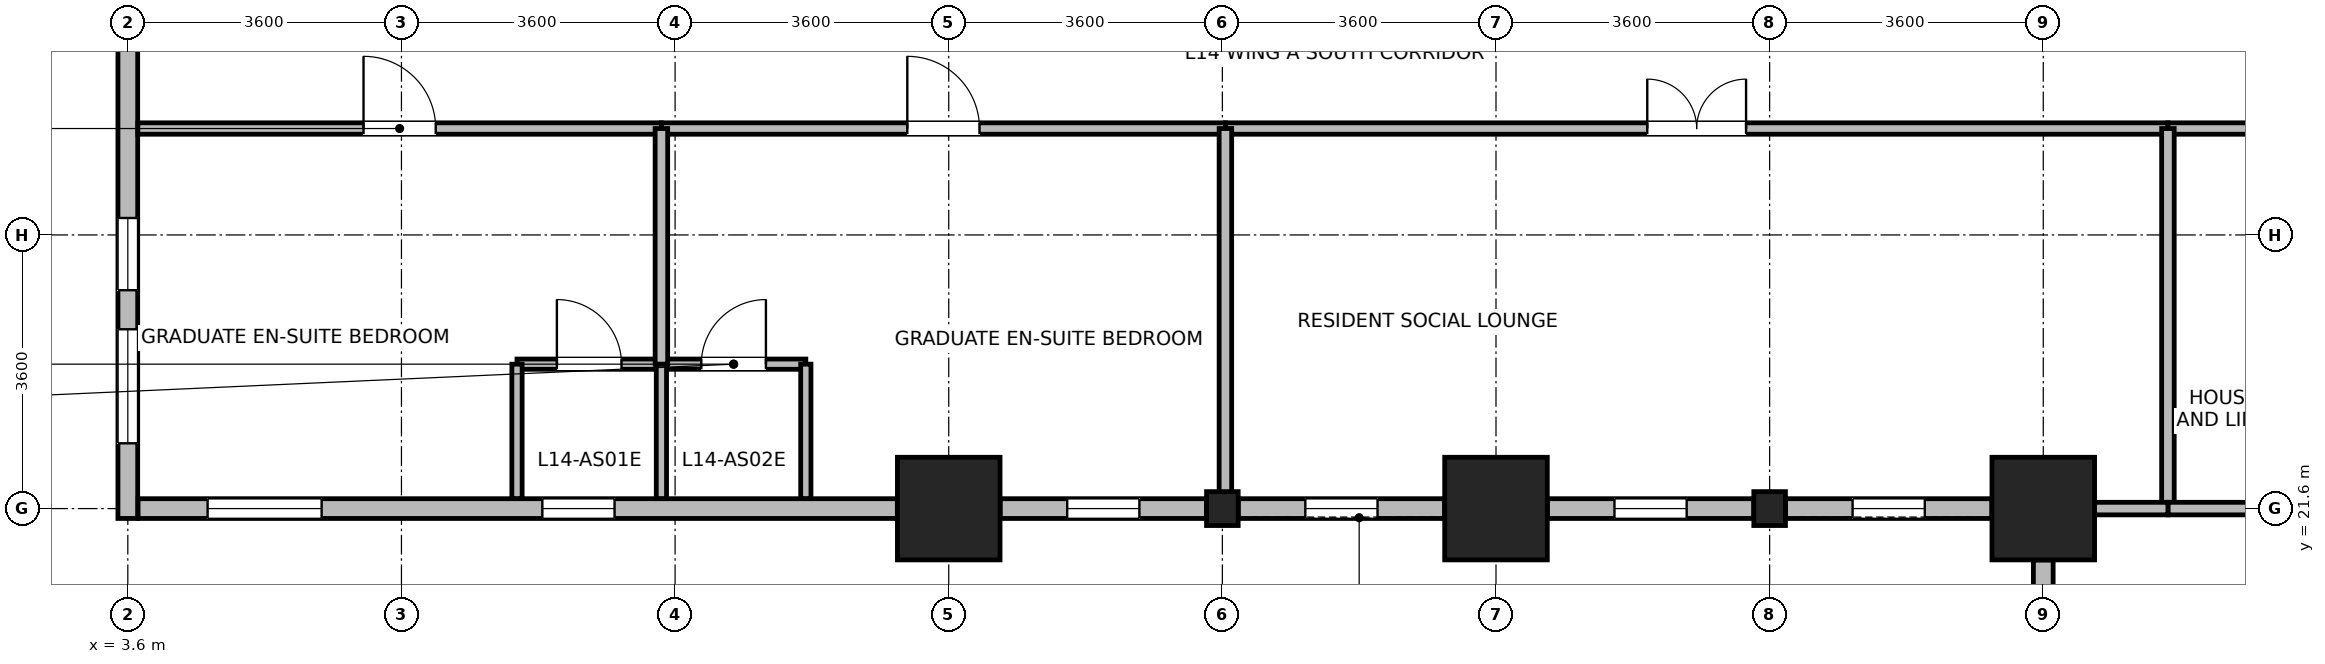
"""IFC4 building model, lengths in metres.
Left out: names, types, materials, properties, quantities, classifications, styles, units other than length and angle.
Written with IfcOpenShell. Run it as: python <this file> out.ifc"""

import sys

from ifc_helpers import new_model, si_unit, direction, frame, frame_2d, origin, origin_2d, place, context, subcontext, project, spatial, rectangle, i_section, extrude, source, transform, mapped, element, fill, save


model = new_model("IFC4")
c1 = context("Model", 3, precision=1e-05, world=origin(), true_north=direction((0.0, 1.0)))
c2 = subcontext(c1, "Body", "Model", "MODEL_VIEW")
j1 = project(units=[si_unit("LENGTHUNIT", "METRE"), si_unit("PLANEANGLEUNIT", "RADIAN")], contexts=[c1])
p1 = place(None, origin())
s1 = spatial("IfcSite", under=j1, at=p1, CompositionType="ELEMENT")
p2 = place(p1, origin())
s2 = spatial("IfcBuilding", under=s1, at=p2, CompositionType="ELEMENT")
p3 = place(p2, frame((0.0, 0.0, 58.6)))
s3 = spatial("IfcBuildingStorey", under=s2, at=p3, CompositionType="ELEMENT", Elevation=58.6)
m1 = source(origin(), c2, "Body", "SweptSolid", [
    extrude(rectangle(XDim=1.35, YDim=1.35, at=origin_2d()), origin(), (0.0, 0.0, 1.0), 3.7),
])
for number, where, z_axis, x_axis in (
    (1, (14.4, 21.6, 0.0), (0.0, 0.0, 1.0), (1.0, 0.0, 0.0)),
    (2, (21.6, 21.6, 0.0), (0.0, 0.0, 1.0), (1.0, 0.0, 0.0)),
    (3, (28.8, 21.6, 0.0), (0.0, 0.0, 1.0), (1.0, 0.0, 0.0)),
):
    element("IfcColumn", number, at=place(p3, frame(where, z_axis=z_axis, x_axis=x_axis)), inside=s3, PredefinedType="COLUMN", context=c2, shape_type="MappedRepresentation", body=[
        mapped(m1, transform((0.0, 0.0, 0.0), x_axis=(1.0, 0.0, 0.0), y_axis=(0.0, 1.0, 0.0), z_axis=(0.0, 0.0, 1.0), scale=1.0)),
    ])
m2 = source(origin(), c2, "Body", "SweptSolid", [
    extrude(i_section(OverallWidth=0.416, OverallDepth=0.446, WebThickness=0.029, FlangeThickness=0.04, FilletRadius=0.015, at=origin_2d()), origin(), (0.0, 0.0, 1.0), 3.7),
])
for number, where, z_axis, x_axis in (
    (4, (18.0, 21.6, 0.0), (0.0, 0.0, 1.0), (1.0, 0.0, 0.0)),
    (5, (25.2, 21.6, 0.0), (0.0, 0.0, 1.0), (1.0, 0.0, 0.0)),
):
    element("IfcColumn", number, at=place(p3, frame(where, z_axis=z_axis, x_axis=x_axis)), inside=s3, PredefinedType="COLUMN", context=c2, shape_type="MappedRepresentation", body=[
        mapped(m2, transform((0.0, 0.0, 0.0), x_axis=(1.0, 0.0, 0.0), y_axis=(0.0, 1.0, 0.0), z_axis=(0.0, 0.0, 1.0), scale=1.0)),
    ])
p4 = place(p3, frame((3.6, 21.47, 0.0), z_axis=(0.0, 0.0, 1.0), x_axis=(0.0, 1.0, 0.0)))
e6 = element("IfcWall", 6, at=p4, inside=s3, PredefinedType="STANDARD", context=c2, shape_type="SweptSolid", body=[
    extrude(rectangle(XDim=6.956, YDim=0.26, at=frame_2d((3.478, 0.0))), origin(), (0.0, 0.0, 1.0), 3.43),
])
p5 = place(p4, frame((0.989, 0.0, 0.85)))
e7 = element("IfcOpeningElement", 7, at=p5, cuts=e6, PredefinedType="OPENING", context=c2, shape_type="SweptSolid", body=[
    extrude(rectangle(XDim=1.5, YDim=1.85, at=frame_2d((0.75, 0.925))), frame((0.0, 0.14, 0.0), z_axis=(0.0, -1.0, 0.0), x_axis=(1.0, 0.0, 0.0)), (0.0, 0.0, 1.0), 0.28),
])
p6 = place(p4, frame((3.003, 0.0, 0.85)))
e8 = element("IfcOpeningElement", 8, at=p6, cuts=e6, PredefinedType="OPENING", context=c2, shape_type="SweptSolid", body=[
    extrude(rectangle(XDim=0.95, YDim=1.75, at=frame_2d((0.475, 0.875))), frame((0.0, 0.14, 0.0), z_axis=(0.0, -1.0, 0.0), x_axis=(1.0, 0.0, 0.0)), (0.0, 0.0, 1.0), 0.28),
])
p7 = place(p3, frame((13.724, 21.6, 0.0), z_axis=(0.0, 0.0, 1.0), x_axis=(-1.0, 0.0, 0.0)))
e9 = element("IfcWall", 9, at=p7, inside=s3, PredefinedType="STANDARD", context=c2, shape_type="SweptSolid", body=[
    extrude(rectangle(XDim=9.989, YDim=0.26, at=frame_2d((4.995, 0.0))), origin(), (0.0, 0.0, 1.0), 3.43),
])
p8 = place(p7, frame((7.574, 0.0, 0.85)))
e10 = element("IfcOpeningElement", 10, at=p8, cuts=e9, PredefinedType="OPENING", context=c2, shape_type="SweptSolid", body=[
    extrude(rectangle(XDim=1.5, YDim=1.85, at=frame_2d((0.75, 0.925))), frame((0.0, 0.14, 0.0), z_axis=(0.0, -1.0, 0.0), x_axis=(1.0, 0.0, 0.0)), (0.0, 0.0, 1.0), 0.28),
])
p9 = place(p7, frame((3.72, 0.0, 0.85)))
e11 = element("IfcOpeningElement", 11, at=p9, cuts=e9, PredefinedType="OPENING", context=c2, shape_type="SweptSolid", body=[
    extrude(rectangle(XDim=0.95, YDim=1.75, at=frame_2d((0.475, 0.875))), frame((0.0, 0.14, 0.0), z_axis=(0.0, -1.0, 0.0), x_axis=(1.0, 0.0, 0.0)), (0.0, 0.0, 1.0), 0.28),
])
p10 = place(p3, frame((17.791, 21.6, 0.0), z_axis=(0.0, 0.0, 1.0), x_axis=(-1.0, 0.0, 0.0)))
e12 = element("IfcWall", 12, at=p10, inside=s3, PredefinedType="STANDARD", context=c2, shape_type="SweptSolid", body=[
    extrude(rectangle(XDim=2.715, YDim=0.26, at=frame_2d((1.357, 0.0))), origin(), (0.0, 0.0, 1.0), 2.93),
])
p11 = place(p10, frame((0.883, 0.0, 0.85)))
e13 = element("IfcOpeningElement", 13, at=p11, cuts=e12, PredefinedType="OPENING", context=c2, shape_type="SweptSolid", body=[
    extrude(rectangle(XDim=0.95, YDim=1.75, at=frame_2d((0.475, 0.875))), frame((0.0, 0.14, 0.0), z_axis=(0.0, -1.0, 0.0), x_axis=(1.0, 0.0, 0.0)), (0.0, 0.0, 1.0), 0.28),
])
p12 = place(p3, frame((20.924, 21.6, 0.0), z_axis=(0.0, 0.0, 1.0), x_axis=(-1.0, 0.0, 0.0)))
e14 = element("IfcWall", 14, at=p12, inside=s3, PredefinedType="STANDARD", context=c2, shape_type="SweptSolid", body=[
    extrude(rectangle(XDim=2.715, YDim=0.26, at=frame_2d((1.357, 0.0))), origin(), (0.0, 0.0, 1.0), 2.93),
])
p13 = place(p12, frame((0.883, 0.0, 0.85)))
e15 = element("IfcOpeningElement", 15, at=p13, cuts=e14, PredefinedType="OPENING", context=c2, shape_type="SweptSolid", body=[
    extrude(rectangle(XDim=0.95, YDim=1.75, at=frame_2d((0.475, 0.875))), frame((0.0, 0.14, 0.0), z_axis=(0.0, -1.0, 0.0), x_axis=(1.0, 0.0, 0.0)), (0.0, 0.0, 1.0), 0.28),
])
p14 = place(p3, frame((24.991, 21.6, 0.0), z_axis=(0.0, 0.0, 1.0), x_axis=(-1.0, 0.0, 0.0)))
e16 = element("IfcWall", 16, at=p14, inside=s3, PredefinedType="STANDARD", context=c2, shape_type="SweptSolid", body=[
    extrude(rectangle(XDim=2.715, YDim=0.26, at=frame_2d((1.357, 0.0))), origin(), (0.0, 0.0, 1.0), 2.93),
])
p15 = place(p14, frame((0.883, 0.0, 0.85)))
e17 = element("IfcOpeningElement", 17, at=p15, cuts=e16, PredefinedType="OPENING", context=c2, shape_type="SweptSolid", body=[
    extrude(rectangle(XDim=0.95, YDim=1.75, at=frame_2d((0.475, 0.875))), frame((0.0, 0.14, 0.0), z_axis=(0.0, -1.0, 0.0), x_axis=(1.0, 0.0, 0.0)), (0.0, 0.0, 1.0), 0.28),
])
p16 = place(p3, frame((28.124, 21.6, 0.0), z_axis=(0.0, 0.0, 1.0), x_axis=(-1.0, 0.0, 0.0)))
e18 = element("IfcWall", 18, at=p16, inside=s3, PredefinedType="STANDARD", context=c2, shape_type="SweptSolid", body=[
    extrude(rectangle(XDim=2.715, YDim=0.26, at=frame_2d((1.357, 0.0))), origin(), (0.0, 0.0, 1.0), 2.93),
])
p17 = place(p16, frame((0.883, 0.0, 0.85)))
e19 = element("IfcOpeningElement", 19, at=p17, cuts=e18, PredefinedType="OPENING", context=c2, shape_type="SweptSolid", body=[
    extrude(rectangle(XDim=0.95, YDim=1.75, at=frame_2d((0.475, 0.875))), frame((0.0, 0.14, 0.0), z_axis=(0.0, -1.0, 0.0), x_axis=(1.0, 0.0, 0.0)), (0.0, 0.0, 1.0), 0.28),
])
p18 = place(p3, frame((28.8, 1.67, 0.0), z_axis=(0.0, 0.0, 1.0), x_axis=(0.0, 1.0, 0.0)))
e20 = element("IfcWall", 20, at=p18, inside=s3, PredefinedType="STANDARD", context=c2, shape_type="SweptSolid", body=[
    extrude(rectangle(XDim=19.254, YDim=0.26, at=frame_2d((9.627, 0.0))), origin(), (0.0, 0.0, 1.0), 3.43),
])
p19 = place(p18, frame((0.854, 0.0, 0.85)))
e21 = element("IfcOpeningElement", 21, at=p19, cuts=e20, PredefinedType="OPENING", context=c2, shape_type="SweptSolid", body=[
    extrude(rectangle(XDim=1.5, YDim=1.85, at=frame_2d((0.75, 0.925))), frame((0.0, 0.14, 0.0), z_axis=(0.0, -1.0, 0.0), x_axis=(1.0, 0.0, 0.0)), (0.0, 0.0, 1.0), 0.28),
])
p20 = place(p18, frame((7.272, 0.0, 0.85)))
e22 = element("IfcOpeningElement", 22, at=p20, cuts=e20, PredefinedType="OPENING", context=c2, shape_type="SweptSolid", body=[
    extrude(rectangle(XDim=1.5, YDim=1.85, at=frame_2d((0.75, 0.925))), frame((0.0, 0.14, 0.0), z_axis=(0.0, -1.0, 0.0), x_axis=(1.0, 0.0, 0.0)), (0.0, 0.0, 1.0), 0.28),
])
p21 = place(p18, frame((10.481, 0.0, 0.85)))
e23 = element("IfcOpeningElement", 23, at=p21, cuts=e20, PredefinedType="OPENING", context=c2, shape_type="SweptSolid", body=[
    extrude(rectangle(XDim=1.5, YDim=1.85, at=frame_2d((0.75, 0.925))), frame((0.0, 0.14, 0.0), z_axis=(0.0, -1.0, 0.0), x_axis=(1.0, 0.0, 0.0)), (0.0, 0.0, 1.0), 0.28),
])
p22 = place(p18, frame((13.69, 0.0, 0.85)))
e24 = element("IfcOpeningElement", 24, at=p22, cuts=e20, PredefinedType="OPENING", context=c2, shape_type="SweptSolid", body=[
    extrude(rectangle(XDim=1.5, YDim=1.85, at=frame_2d((0.75, 0.925))), frame((0.0, 0.14, 0.0), z_axis=(0.0, -1.0, 0.0), x_axis=(1.0, 0.0, 0.0)), (0.0, 0.0, 1.0), 0.28),
])
p23 = place(p18, frame((16.899, 0.0, 0.85)))
e25 = element("IfcOpeningElement", 25, at=p23, cuts=e20, PredefinedType="OPENING", context=c2, shape_type="SweptSolid", body=[
    extrude(rectangle(XDim=1.5, YDim=1.85, at=frame_2d((0.75, 0.925))), frame((0.0, 0.14, 0.0), z_axis=(0.0, -1.0, 0.0), x_axis=(1.0, 0.0, 0.0)), (0.0, 0.0, 1.0), 0.28),
])
p24 = place(p3, frame((10.62, 23.5, 0.0), z_axis=(0.0, 0.0, 1.0), x_axis=(1.0, 0.0, 0.0)))
e26 = element("IfcWall", 26, at=p24, inside=s3, PredefinedType="PARTITIONING", context=c2, shape_type="SweptSolid", body=[
    extrude(rectangle(XDim=1.9, YDim=0.135, at=frame_2d((0.95, 0.0))), origin(), (0.0, 0.0, 1.0), 3.43),
])
p25 = place(p24, frame((0.525, 0.0, 0.0)))
e27 = element("IfcOpeningElement", 27, at=p25, cuts=e26, PredefinedType="OPENING", context=c2, shape_type="SweptSolid", body=[
    extrude(rectangle(XDim=0.85, YDim=2.04, at=frame_2d((0.425, 1.02))), frame((0.0, 0.078, 0.0), z_axis=(0.0, -1.0, 0.0), x_axis=(1.0, 0.0, 0.0)), (0.0, 0.0, 1.0), 0.155),
])
p26 = place(p3, frame((8.72, 23.5, 0.0), z_axis=(0.0, 0.0, 1.0), x_axis=(1.0, 0.0, 0.0)))
e28 = element("IfcWall", 28, at=p26, inside=s3, PredefinedType="PARTITIONING", context=c2, shape_type="SweptSolid", body=[
    extrude(rectangle(XDim=1.9, YDim=0.135, at=frame_2d((0.95, 0.0))), origin(), (0.0, 0.0, 1.0), 3.43),
])
p27 = place(p26, frame((0.525, 0.0, 0.0)))
e29 = element("IfcOpeningElement", 29, at=p27, cuts=e28, PredefinedType="OPENING", context=c2, shape_type="SweptSolid", body=[
    extrude(rectangle(XDim=0.85, YDim=2.04, at=frame_2d((0.425, 1.02))), frame((0.0, 0.078, 0.0), z_axis=(0.0, -1.0, 0.0), x_axis=(1.0, 0.0, 0.0)), (0.0, 0.0, 1.0), 0.155),
])
for number, where, z_axis, x_axis in (
    (30, (8.72, 21.732, 0.0), (0.0, 0.0, 1.0), (0.0, 1.0, 0.0)),
    (31, (10.62, 21.732, 0.0), (0.0, 0.0, 1.0), (0.0, 1.0, 0.0)),
    (32, (12.52, 21.732, 0.0), (0.0, 0.0, 1.0), (0.0, 1.0, 0.0)),
):
    element("IfcWall", number, at=place(p3, frame(where, z_axis=z_axis, x_axis=x_axis)), inside=s3, PredefinedType="PARTITIONING", context=c2, shape_type="SweptSolid", body=[
        extrude(rectangle(XDim=1.768, YDim=0.135, at=frame_2d((0.884, 0.0))), origin(), (0.0, 0.0, 1.0), 3.43),
    ])
p28 = place(p3, frame((18.04, 26.6, 0.0), z_axis=(0.0, 0.0, 1.0), x_axis=(1.0, 0.0, 0.0)))
e33 = element("IfcWall", 33, at=p28, inside=s3, PredefinedType="PARTITIONING", context=c2, shape_type="SweptSolid", body=[
    extrude(rectangle(XDim=12.4, YDim=0.15, at=frame_2d((6.2, 0.0))), origin(), (0.0, 0.0, 1.0), 3.43),
])
p29 = place(p28, frame((5.55, 0.0, 0.0)))
e34 = element("IfcOpeningElement", 34, at=p29, cuts=e33, PredefinedType="OPENING", context=c2, shape_type="SweptSolid", body=[
    extrude(rectangle(XDim=1.3, YDim=2.12, at=frame_2d((0.65, 1.06))), frame((0.0, 0.085, 0.0), z_axis=(0.0, -1.0, 0.0), x_axis=(1.0, 0.0, 0.0)), (0.0, 0.0, 1.0), 0.17),
])
p30 = place(p3, frame((10.62, 26.6, 0.0), z_axis=(0.0, 0.0, 1.0), x_axis=(1.0, 0.0, 0.0)))
e35 = element("IfcWall", 35, at=p30, inside=s3, PredefinedType="PARTITIONING", context=c2, shape_type="SweptSolid", body=[
    extrude(rectangle(XDim=7.42, YDim=0.15, at=frame_2d((3.71, 0.0))), origin(), (0.0, 0.0, 1.0), 3.43),
])
p31 = place(p30, frame((3.235, 0.0, 0.0)))
e36 = element("IfcOpeningElement", 36, at=p31, cuts=e35, PredefinedType="OPENING", context=c2, shape_type="SweptSolid", body=[
    extrude(rectangle(XDim=0.95, YDim=2.1, at=frame_2d((0.475, 1.05))), frame((0.0, 0.085, 0.0), z_axis=(0.0, -1.0, 0.0), x_axis=(1.0, 0.0, 0.0)), (0.0, 0.0, 1.0), 0.17),
])
p32 = place(p3, frame((3.732, 26.6, 0.0), z_axis=(0.0, 0.0, 1.0), x_axis=(1.0, 0.0, 0.0)))
e37 = element("IfcWall", 37, at=p32, inside=s3, PredefinedType="PARTITIONING", context=c2, shape_type="SweptSolid", body=[
    extrude(rectangle(XDim=6.888, YDim=0.15, at=frame_2d((3.444, 0.0))), origin(), (0.0, 0.0, 1.0), 3.43),
])
p33 = place(p32, frame((2.969, 0.0, 0.0)))
e38 = element("IfcOpeningElement", 38, at=p33, cuts=e37, PredefinedType="OPENING", context=c2, shape_type="SweptSolid", body=[
    extrude(rectangle(XDim=0.95, YDim=2.1, at=frame_2d((0.475, 1.05))), frame((0.0, 0.085, 0.0), z_axis=(0.0, -1.0, 0.0), x_axis=(1.0, 0.0, 0.0)), (0.0, 0.0, 1.0), 0.17),
])
p34 = place(p3, frame((30.44, 26.6, 0.0), z_axis=(0.0, 0.0, 1.0), x_axis=(1.0, 0.0, 0.0)))
e39 = element("IfcWall", 39, at=p34, inside=s3, PredefinedType="PARTITIONING", context=c2, shape_type="SweptSolid", body=[
    extrude(rectangle(XDim=2.92, YDim=0.15, at=frame_2d((1.46, 0.0))), origin(), (0.0, 0.0, 1.0), 3.43),
])
p35 = place(p3, frame((18.04, 21.732, 0.0), z_axis=(0.0, 0.0, 1.0), x_axis=(0.0, 1.0, 0.0)))
e40 = element("IfcWall", 40, at=p35, inside=s3, PredefinedType="PARTITIONING", context=c2, shape_type="SweptSolid", body=[
    extrude(rectangle(XDim=4.868, YDim=0.165, at=frame_2d((2.434, 0.0))), origin(), (0.0, 0.0, 1.0), 3.07),
])
p36 = place(p3, frame((30.44, 21.6, 0.0), z_axis=(0.0, 0.0, 1.0), x_axis=(0.0, 1.0, 0.0)))
e41 = element("IfcWall", 41, at=p36, inside=s3, PredefinedType="PARTITIONING", context=c2, shape_type="SweptSolid", body=[
    extrude(rectangle(XDim=5.0, YDim=0.165, at=frame_2d((2.5, 0.0))), origin(), (0.0, 0.0, 1.0), 3.43),
])
p37 = place(p3, frame((10.62, 23.5, 0.0), z_axis=(0.0, 0.0, 1.0), x_axis=(0.0, 1.0, 0.0)))
e42 = element("IfcWall", 42, at=p37, inside=s3, PredefinedType="PARTITIONING", context=c2, shape_type="SweptSolid", body=[
    extrude(rectangle(XDim=3.1, YDim=0.165, at=frame_2d((1.55, 0.0))), origin(), (0.0, 0.0, 1.0), 3.43),
])
p38 = place(p3, frame((30.44, 21.6, 0.0), z_axis=(0.0, 0.0, 1.0), x_axis=(1.0, 0.0, 0.0)))
e43 = element("IfcWall", 43, at=p38, inside=s3, PredefinedType="PARTITIONING", context=c2, shape_type="SweptSolid", body=[
    extrude(rectangle(XDim=2.92, YDim=0.165, at=frame_2d((1.46, 0.0))), origin(), (0.0, 0.0, 1.0), 2.93),
])
p39 = place(p3, frame((28.932, 21.6, 0.0), z_axis=(0.0, 0.0, 1.0), x_axis=(1.0, 0.0, 0.0)))
e44 = element("IfcWall", 44, at=p39, inside=s3, PredefinedType="PARTITIONING", context=c2, shape_type="SweptSolid", body=[
    extrude(rectangle(XDim=1.508, YDim=0.165, at=frame_2d((0.754, 0.0))), origin(), (0.0, 0.0, 1.0), 2.93),
])
p40 = place(p5, origin())
e45 = element("IfcWindow", 45, at=p40, inside=s3, PartitioningType="SINGLE_PANEL", PredefinedType="WINDOW", context=c2, shape_type="SweptSolid", body=[
    extrude(rectangle(XDim=1.5, YDim=1.85, at=frame_2d((0.75, 0.925))), frame((0.0, 0.03, 0.0), z_axis=(0.0, -1.0, 0.0), x_axis=(1.0, 0.0, 0.0)), (0.0, 0.0, 1.0), 0.06),
])
fill(e7, e45)
p41 = place(p6, origin())
e46 = element("IfcWindow", 46, at=p41, inside=s3, PartitioningType="SINGLE_PANEL", PredefinedType="WINDOW", context=c2, shape_type="SweptSolid", body=[
    extrude(rectangle(XDim=0.95, YDim=1.75, at=frame_2d((0.475, 0.875))), frame((0.0, 0.03, 0.0), z_axis=(0.0, -1.0, 0.0), x_axis=(1.0, 0.0, 0.0)), (0.0, 0.0, 1.0), 0.06),
])
fill(e8, e46)
p42 = place(p8, origin())
e47 = element("IfcWindow", 47, at=p42, inside=s3, PartitioningType="SINGLE_PANEL", PredefinedType="WINDOW", context=c2, shape_type="SweptSolid", body=[
    extrude(rectangle(XDim=1.5, YDim=1.85, at=frame_2d((0.75, 0.925))), frame((0.0, 0.03, 0.0), z_axis=(0.0, -1.0, 0.0), x_axis=(1.0, 0.0, 0.0)), (0.0, 0.0, 1.0), 0.06),
])
fill(e10, e47)
p43 = place(p9, origin())
e48 = element("IfcWindow", 48, at=p43, inside=s3, PartitioningType="SINGLE_PANEL", PredefinedType="WINDOW", context=c2, shape_type="SweptSolid", body=[
    extrude(rectangle(XDim=0.95, YDim=1.75, at=frame_2d((0.475, 0.875))), frame((0.0, 0.03, 0.0), z_axis=(0.0, -1.0, 0.0), x_axis=(1.0, 0.0, 0.0)), (0.0, 0.0, 1.0), 0.06),
])
fill(e11, e48)
p44 = place(p11, origin())
e49 = element("IfcWindow", 49, at=p44, inside=s3, PartitioningType="SINGLE_PANEL", PredefinedType="WINDOW", context=c2, shape_type="SweptSolid", body=[
    extrude(rectangle(XDim=0.95, YDim=1.75, at=frame_2d((0.475, 0.875))), frame((0.0, 0.03, 0.0), z_axis=(0.0, -1.0, 0.0), x_axis=(1.0, 0.0, 0.0)), (0.0, 0.0, 1.0), 0.06),
])
fill(e13, e49)
p45 = place(p13, origin())
e50 = element("IfcWindow", 50, at=p45, inside=s3, PartitioningType="SINGLE_PANEL", PredefinedType="WINDOW", context=c2, shape_type="SweptSolid", body=[
    extrude(rectangle(XDim=0.95, YDim=1.75, at=frame_2d((0.475, 0.875))), frame((0.0, 0.03, 0.0), z_axis=(0.0, -1.0, 0.0), x_axis=(1.0, 0.0, 0.0)), (0.0, 0.0, 1.0), 0.06),
])
fill(e15, e50)
p46 = place(p15, origin())
e51 = element("IfcWindow", 51, at=p46, inside=s3, PartitioningType="SINGLE_PANEL", PredefinedType="WINDOW", context=c2, shape_type="SweptSolid", body=[
    extrude(rectangle(XDim=0.95, YDim=1.75, at=frame_2d((0.475, 0.875))), frame((0.0, 0.03, 0.0), z_axis=(0.0, -1.0, 0.0), x_axis=(1.0, 0.0, 0.0)), (0.0, 0.0, 1.0), 0.06),
])
fill(e17, e51)
p47 = place(p17, origin())
e52 = element("IfcWindow", 52, at=p47, inside=s3, PartitioningType="SINGLE_PANEL", PredefinedType="WINDOW", context=c2, shape_type="SweptSolid", body=[
    extrude(rectangle(XDim=0.95, YDim=1.75, at=frame_2d((0.475, 0.875))), frame((0.0, 0.03, 0.0), z_axis=(0.0, -1.0, 0.0), x_axis=(1.0, 0.0, 0.0)), (0.0, 0.0, 1.0), 0.06),
])
fill(e19, e52)
p48 = place(p25, origin())
e53 = element("IfcDoor", 53, at=p48, inside=s3, OperationType="SINGLE_SWING_RIGHT", PredefinedType="DOOR", context=c2, shape_type="SweptSolid", body=[
    extrude(rectangle(XDim=0.85, YDim=2.04, at=frame_2d((0.425, 1.02))), frame((0.0, 0.025, 0.0), z_axis=(0.0, -1.0, 0.0), x_axis=(1.0, 0.0, 0.0)), (0.0, 0.0, 1.0), 0.05),
])
fill(e27, e53)
p49 = place(p27, origin())
e54 = element("IfcDoor", 54, at=p49, inside=s3, OperationType="SINGLE_SWING_LEFT", PredefinedType="DOOR", context=c2, shape_type="SweptSolid", body=[
    extrude(rectangle(XDim=0.85, YDim=2.04, at=frame_2d((0.425, 1.02))), frame((0.0, 0.025, 0.0), z_axis=(0.0, -1.0, 0.0), x_axis=(1.0, 0.0, 0.0)), (0.0, 0.0, 1.0), 0.05),
])
fill(e29, e54)
p50 = place(p29, origin())
e55 = element("IfcDoor", 55, at=p50, inside=s3, OperationType="DOUBLE_DOOR_SINGLE_SWING", PredefinedType="DOOR", context=c2, shape_type="SweptSolid", body=[
    extrude(rectangle(XDim=1.3, YDim=2.12, at=frame_2d((0.65, 1.06))), frame((0.0, 0.025, 0.0), z_axis=(0.0, -1.0, 0.0), x_axis=(1.0, 0.0, 0.0)), (0.0, 0.0, 1.0), 0.05),
])
fill(e34, e55)
p51 = place(p31, origin())
e56 = element("IfcDoor", 56, at=p51, inside=s3, OperationType="SINGLE_SWING_LEFT", PredefinedType="DOOR", context=c2, shape_type="SweptSolid", body=[
    extrude(rectangle(XDim=0.95, YDim=2.1, at=frame_2d((0.475, 1.05))), frame((0.0, 0.025, 0.0), z_axis=(0.0, -1.0, 0.0), x_axis=(1.0, 0.0, 0.0)), (0.0, 0.0, 1.0), 0.05),
])
fill(e36, e56)
p52 = place(p33, origin())
e57 = element("IfcDoor", 57, at=p52, inside=s3, OperationType="SINGLE_SWING_LEFT", PredefinedType="DOOR", context=c2, shape_type="SweptSolid", body=[
    extrude(rectangle(XDim=0.95, YDim=2.1, at=frame_2d((0.475, 1.05))), frame((0.0, 0.025, 0.0), z_axis=(0.0, -1.0, 0.0), x_axis=(1.0, 0.0, 0.0)), (0.0, 0.0, 1.0), 0.05),
])
fill(e38, e57)
save(model, sys.argv[1])
